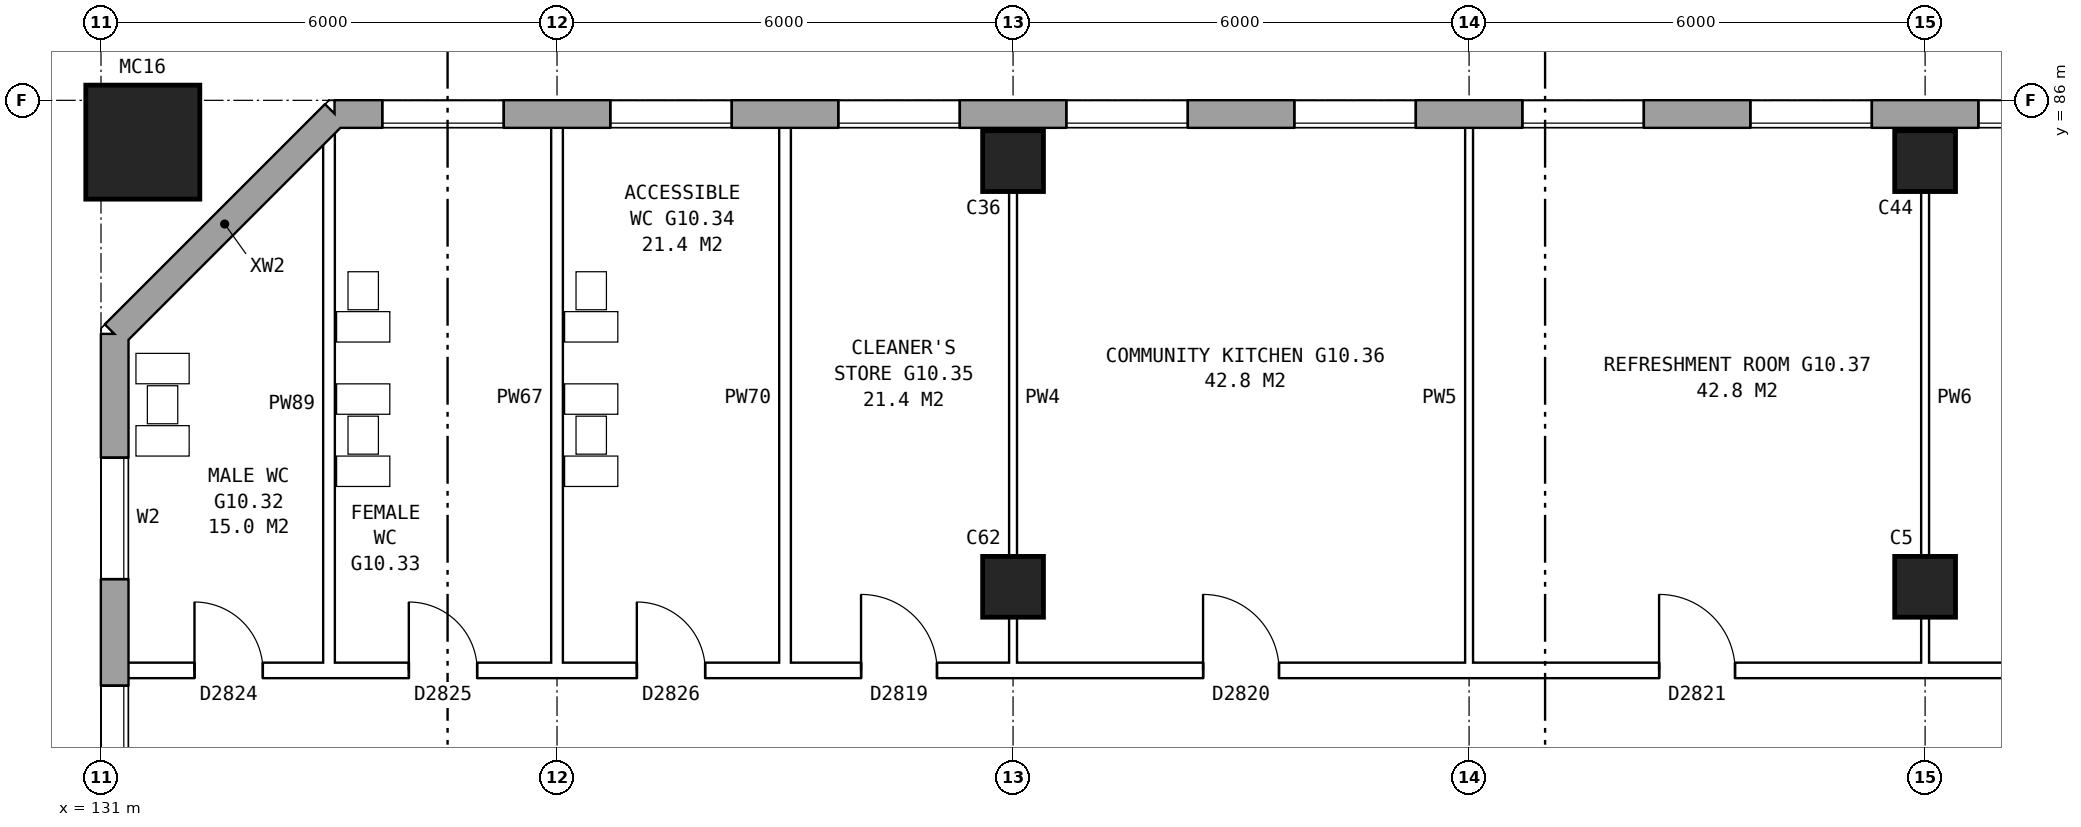
"""IFC4 building model, lengths in metres.
Left out: names, types, materials, properties, quantities, classifications, styles, units other than length and angle.
Written with IfcOpenShell. Run it as: python <this file> out.ifc"""

import sys

from ifc_helpers import new_model, si_unit, direction, frame, frame_2d, origin, origin_2d, place, context, subcontext, project, spatial, rectangle, hollow_rectangle, extrude, element, fill, save


model = new_model("IFC4")
c1 = context("Model", 3, precision=1e-05, world=origin(), true_north=direction((0.0, 1.0)))
c2 = subcontext(c1, "Body", "Model", "MODEL_VIEW")
j1 = project(units=[si_unit("LENGTHUNIT", "METRE"), si_unit("PLANEANGLEUNIT", "RADIAN")], contexts=[c1])
p1 = place(None, origin())
s1 = spatial("IfcSite", under=j1, at=p1, CompositionType="ELEMENT")
p2 = place(p1, origin())
s2 = spatial("IfcBuilding", under=s1, at=p2, CompositionType="ELEMENT")
p3 = place(p2, frame((0.0, 0.0, 38.1)))
s3 = spatial("IfcBuildingStorey", under=s2, at=p3, CompositionType="ELEMENT", Elevation=38.1)
for number, where, z_axis, x_axis in (
    (1, (143.0, 79.6, 0.0), (0.0, 0.0, 1.0), (1.0, 0.0, 0.0)),
    (2, (143.0, 85.2, 0.0), (0.0, 0.0, 1.0), (1.0, 0.0, 0.0)),
    (3, (155.0, 79.6, 0.0), (0.0, 0.0, 1.0), (1.0, 0.0, 0.0)),
    (4, (155.0, 85.2, 0.0), (0.0, 0.0, 1.0), (1.0, 0.0, 0.0)),
):
    element("IfcColumn", number, at=place(p3, frame(where, z_axis=z_axis, x_axis=x_axis)), inside=s3, PredefinedType="COLUMN", context=c2, shape_type="SweptSolid", body=[
        extrude(rectangle(XDim=0.8, YDim=0.8, at=origin_2d()), origin(), (0.0, 0.0, 1.0), 5.6),
    ])
p4 = place(p3, frame((131.55, 85.45, 0.0), z_axis=(0.0, 0.0, 1.0), x_axis=(1.0, 0.0, 0.0)))
e5 = element("IfcColumn", 5, at=p4, inside=s3, PredefinedType="COLUMN", context=c2, shape_type="SweptSolid", body=[
    extrude(hollow_rectangle(XDim=1.5, YDim=1.5, WallThickness=0.08, at=origin_2d()), origin(), (0.0, 0.0, 1.0), 6.2),
])
p5 = place(p3, frame((173.425, 85.82, 0.0), z_axis=(0.0, 0.0, 1.0), x_axis=(-1.0, 0.0, 0.0)))
e6 = element("IfcWall", 6, at=p5, inside=s3, PredefinedType="STANDARD", context=c2, shape_type="SweptSolid", body=[
    extrude(rectangle(XDim=39.351, YDim=0.36, at=frame_2d((19.675, 0.0))), origin(), (0.0, 0.0, 1.0), 5.6),
])
p6 = place(p5, frame((1.125, 0.0, 0.15)))
e7 = element("IfcOpeningElement", 7, at=p6, cuts=e6, PredefinedType="OPENING", context=c2, shape_type="SweptSolid", body=[
    extrude(rectangle(XDim=1.6, YDim=2.4, at=frame_2d((0.8, 1.2))), frame((0.0, 0.19, 0.0), z_axis=(0.0, -1.0, 0.0), x_axis=(1.0, 0.0, 0.0)), (0.0, 0.0, 1.0), 0.38),
])
p7 = place(p5, frame((4.125, 0.0, 0.15)))
e8 = element("IfcOpeningElement", 8, at=p7, cuts=e6, PredefinedType="OPENING", context=c2, shape_type="SweptSolid", body=[
    extrude(rectangle(XDim=1.6, YDim=2.4, at=frame_2d((0.8, 1.2))), frame((0.0, 0.19, 0.0), z_axis=(0.0, -1.0, 0.0), x_axis=(1.0, 0.0, 0.0)), (0.0, 0.0, 1.0), 0.38),
])
p8 = place(p5, frame((7.125, 0.0, 0.15)))
e9 = element("IfcOpeningElement", 9, at=p8, cuts=e6, PredefinedType="OPENING", context=c2, shape_type="SweptSolid", body=[
    extrude(rectangle(XDim=1.6, YDim=2.4, at=frame_2d((0.8, 1.2))), frame((0.0, 0.19, 0.0), z_axis=(0.0, -1.0, 0.0), x_axis=(1.0, 0.0, 0.0)), (0.0, 0.0, 1.0), 0.38),
])
p9 = place(p5, frame((10.125, 0.0, 0.15)))
e10 = element("IfcOpeningElement", 10, at=p9, cuts=e6, PredefinedType="OPENING", context=c2, shape_type="SweptSolid", body=[
    extrude(rectangle(XDim=1.6, YDim=2.4, at=frame_2d((0.8, 1.2))), frame((0.0, 0.19, 0.0), z_axis=(0.0, -1.0, 0.0), x_axis=(1.0, 0.0, 0.0)), (0.0, 0.0, 1.0), 0.38),
])
p10 = place(p5, frame((13.125, 0.0, 0.15)))
e11 = element("IfcOpeningElement", 11, at=p10, cuts=e6, PredefinedType="OPENING", context=c2, shape_type="SweptSolid", body=[
    extrude(rectangle(XDim=1.6, YDim=2.4, at=frame_2d((0.8, 1.2))), frame((0.0, 0.19, 0.0), z_axis=(0.0, -1.0, 0.0), x_axis=(1.0, 0.0, 0.0)), (0.0, 0.0, 1.0), 0.38),
])
p11 = place(p5, frame((16.125, 0.0, 0.15)))
e12 = element("IfcOpeningElement", 12, at=p11, cuts=e6, PredefinedType="OPENING", context=c2, shape_type="SweptSolid", body=[
    extrude(rectangle(XDim=1.6, YDim=2.4, at=frame_2d((0.8, 1.2))), frame((0.0, 0.19, 0.0), z_axis=(0.0, -1.0, 0.0), x_axis=(1.0, 0.0, 0.0)), (0.0, 0.0, 1.0), 0.38),
])
p12 = place(p5, frame((19.125, 0.0, 0.15)))
e13 = element("IfcOpeningElement", 13, at=p12, cuts=e6, PredefinedType="OPENING", context=c2, shape_type="SweptSolid", body=[
    extrude(rectangle(XDim=1.6, YDim=2.4, at=frame_2d((0.8, 1.2))), frame((0.0, 0.19, 0.0), z_axis=(0.0, -1.0, 0.0), x_axis=(1.0, 0.0, 0.0)), (0.0, 0.0, 1.0), 0.38),
])
p13 = place(p5, frame((22.125, 0.0, 0.15)))
e14 = element("IfcOpeningElement", 14, at=p13, cuts=e6, PredefinedType="OPENING", context=c2, shape_type="SweptSolid", body=[
    extrude(rectangle(XDim=1.6, YDim=2.4, at=frame_2d((0.8, 1.2))), frame((0.0, 0.19, 0.0), z_axis=(0.0, -1.0, 0.0), x_axis=(1.0, 0.0, 0.0)), (0.0, 0.0, 1.0), 0.38),
])
p14 = place(p5, frame((25.125, 0.0, 0.15)))
e15 = element("IfcOpeningElement", 15, at=p14, cuts=e6, PredefinedType="OPENING", context=c2, shape_type="SweptSolid", body=[
    extrude(rectangle(XDim=1.6, YDim=2.4, at=frame_2d((0.8, 1.2))), frame((0.0, 0.19, 0.0), z_axis=(0.0, -1.0, 0.0), x_axis=(1.0, 0.0, 0.0)), (0.0, 0.0, 1.0), 0.38),
])
p15 = place(p5, frame((28.125, 0.0, 0.15)))
e16 = element("IfcOpeningElement", 16, at=p15, cuts=e6, PredefinedType="OPENING", context=c2, shape_type="SweptSolid", body=[
    extrude(rectangle(XDim=1.6, YDim=2.4, at=frame_2d((0.8, 1.2))), frame((0.0, 0.19, 0.0), z_axis=(0.0, -1.0, 0.0), x_axis=(1.0, 0.0, 0.0)), (0.0, 0.0, 1.0), 0.38),
])
p16 = place(p5, frame((31.125, 0.0, 0.15)))
e17 = element("IfcOpeningElement", 17, at=p16, cuts=e6, PredefinedType="OPENING", context=c2, shape_type="SweptSolid", body=[
    extrude(rectangle(XDim=1.6, YDim=2.4, at=frame_2d((0.8, 1.2))), frame((0.0, 0.19, 0.0), z_axis=(0.0, -1.0, 0.0), x_axis=(1.0, 0.0, 0.0)), (0.0, 0.0, 1.0), 0.38),
])
p17 = place(p5, frame((34.125, 0.0, 0.15)))
e18 = element("IfcOpeningElement", 18, at=p17, cuts=e6, PredefinedType="OPENING", context=c2, shape_type="SweptSolid", body=[
    extrude(rectangle(XDim=1.6, YDim=2.4, at=frame_2d((0.8, 1.2))), frame((0.0, 0.19, 0.0), z_axis=(0.0, -1.0, 0.0), x_axis=(1.0, 0.0, 0.0)), (0.0, 0.0, 1.0), 0.38),
])
p18 = place(p5, frame((37.125, 0.0, 0.15)))
e19 = element("IfcOpeningElement", 19, at=p18, cuts=e6, PredefinedType="OPENING", context=c2, shape_type="SweptSolid", body=[
    extrude(rectangle(XDim=1.6, YDim=2.4, at=frame_2d((0.8, 1.2))), frame((0.0, 0.19, 0.0), z_axis=(0.0, -1.0, 0.0), x_axis=(1.0, 0.0, 0.0)), (0.0, 0.0, 1.0), 0.38),
])
p19 = place(p3, frame((134.075, 85.82, 0.0), z_axis=(0.0, 0.0, 1.0), x_axis=(-0.707106781187, -0.707106781187, 0.0)))
e20 = element("IfcWall", 20, at=p19, inside=s3, PredefinedType="STANDARD", context=c2, shape_type="SweptSolid", body=[
    extrude(rectangle(XDim=4.094, YDim=0.36, at=frame_2d((2.047, 0.0))), origin(), (0.0, 0.0, 1.0), 5.6),
])
p20 = place(p3, frame((131.18, 82.925, 0.0), z_axis=(0.0, 0.0, 1.0), x_axis=(0.0, -1.0, 0.0)))
e21 = element("IfcWall", 21, at=p20, inside=s3, PredefinedType="STANDARD", context=c2, shape_type="SweptSolid", body=[
    extrude(rectangle(XDim=25.851, YDim=0.36, at=frame_2d((12.925, 0.0))), origin(), (0.0, 0.0, 1.0), 5.6),
])
p21 = place(p20, frame((1.625, 0.0, 0.15)))
e22 = element("IfcOpeningElement", 22, at=p21, cuts=e21, PredefinedType="OPENING", context=c2, shape_type="SweptSolid", body=[
    extrude(rectangle(XDim=1.6, YDim=2.4, at=frame_2d((0.8, 1.2))), frame((0.0, 0.19, 0.0), z_axis=(0.0, -1.0, 0.0), x_axis=(1.0, 0.0, 0.0)), (0.0, 0.0, 1.0), 0.38),
])
p22 = place(p20, frame((4.625, 0.0, 0.15)))
e23 = element("IfcOpeningElement", 23, at=p22, cuts=e21, PredefinedType="OPENING", context=c2, shape_type="SweptSolid", body=[
    extrude(rectangle(XDim=1.6, YDim=2.4, at=frame_2d((0.8, 1.2))), frame((0.0, 0.19, 0.0), z_axis=(0.0, -1.0, 0.0), x_axis=(1.0, 0.0, 0.0)), (0.0, 0.0, 1.0), 0.38),
])
p23 = place(p20, frame((19.625, 0.0, 0.15)))
e24 = element("IfcOpeningElement", 24, at=p23, cuts=e21, PredefinedType="OPENING", context=c2, shape_type="SweptSolid", body=[
    extrude(rectangle(XDim=1.6, YDim=2.4, at=frame_2d((0.8, 1.2))), frame((0.0, 0.19, 0.0), z_axis=(0.0, -1.0, 0.0), x_axis=(1.0, 0.0, 0.0)), (0.0, 0.0, 1.0), 0.38),
])
p24 = place(p20, frame((22.625, 0.0, 0.15)))
e25 = element("IfcOpeningElement", 25, at=p24, cuts=e21, PredefinedType="OPENING", context=c2, shape_type="SweptSolid", body=[
    extrude(rectangle(XDim=1.6, YDim=2.4, at=frame_2d((0.8, 1.2))), frame((0.0, 0.19, 0.0), z_axis=(0.0, -1.0, 0.0), x_axis=(1.0, 0.0, 0.0)), (0.0, 0.0, 1.0), 0.38),
])
p25 = place(p3, frame((131.24, 78.5, 0.0), z_axis=(0.0, 0.0, 1.0), x_axis=(1.0, 0.0, 0.0)))
e26 = element("IfcWall", 26, at=p25, inside=s3, PredefinedType="PARTITIONING", context=c2, shape_type="SweptSolid", body=[
    extrude(rectangle(XDim=37.5, YDim=0.2, at=frame_2d((18.75, 0.0))), origin(), (0.0, 0.0, 1.0), 5.6),
])
p26 = place(p25, frame((0.99, 0.0, 0.0)))
e27 = element("IfcOpeningElement", 27, at=p26, cuts=e26, PredefinedType="OPENING", context=c2, shape_type="SweptSolid", body=[
    extrude(rectangle(XDim=0.9, YDim=2.1, at=frame_2d((0.45, 1.05))), frame((0.0, 0.11, 0.0), z_axis=(0.0, -1.0, 0.0), x_axis=(1.0, 0.0, 0.0)), (0.0, 0.0, 1.0), 0.22),
])
p27 = place(p25, frame((3.81, 0.0, 0.0)))
e28 = element("IfcOpeningElement", 28, at=p27, cuts=e26, PredefinedType="OPENING", context=c2, shape_type="SweptSolid", body=[
    extrude(rectangle(XDim=0.9, YDim=2.1, at=frame_2d((0.45, 1.05))), frame((0.0, 0.11, 0.0), z_axis=(0.0, -1.0, 0.0), x_axis=(1.0, 0.0, 0.0)), (0.0, 0.0, 1.0), 0.22),
])
p28 = place(p25, frame((6.81, 0.0, 0.0)))
e29 = element("IfcOpeningElement", 29, at=p28, cuts=e26, PredefinedType="OPENING", context=c2, shape_type="SweptSolid", body=[
    extrude(rectangle(XDim=0.9, YDim=2.1, at=frame_2d((0.45, 1.05))), frame((0.0, 0.11, 0.0), z_axis=(0.0, -1.0, 0.0), x_axis=(1.0, 0.0, 0.0)), (0.0, 0.0, 1.0), 0.22),
])
p29 = place(p25, frame((9.76, 0.0, 0.0)))
e30 = element("IfcOpeningElement", 30, at=p29, cuts=e26, PredefinedType="OPENING", context=c2, shape_type="SweptSolid", body=[
    extrude(rectangle(XDim=1.0, YDim=2.1, at=frame_2d((0.5, 1.05))), frame((0.0, 0.11, 0.0), z_axis=(0.0, -1.0, 0.0), x_axis=(1.0, 0.0, 0.0)), (0.0, 0.0, 1.0), 0.22),
])
p30 = place(p25, frame((14.26, 0.0, 0.0)))
e31 = element("IfcOpeningElement", 31, at=p30, cuts=e26, PredefinedType="OPENING", context=c2, shape_type="SweptSolid", body=[
    extrude(rectangle(XDim=1.0, YDim=2.1, at=frame_2d((0.5, 1.05))), frame((0.0, 0.11, 0.0), z_axis=(0.0, -1.0, 0.0), x_axis=(1.0, 0.0, 0.0)), (0.0, 0.0, 1.0), 0.22),
])
p31 = place(p25, frame((20.26, 0.0, 0.0)))
e32 = element("IfcOpeningElement", 32, at=p31, cuts=e26, PredefinedType="OPENING", context=c2, shape_type="SweptSolid", body=[
    extrude(rectangle(XDim=1.0, YDim=2.1, at=frame_2d((0.5, 1.05))), frame((0.0, 0.11, 0.0), z_axis=(0.0, -1.0, 0.0), x_axis=(1.0, 0.0, 0.0)), (0.0, 0.0, 1.0), 0.22),
])
p32 = place(p25, frame((26.26, 0.0, 0.0)))
e33 = element("IfcOpeningElement", 33, at=p32, cuts=e26, PredefinedType="OPENING", context=c2, shape_type="SweptSolid", body=[
    extrude(rectangle(XDim=1.0, YDim=2.1, at=frame_2d((0.5, 1.05))), frame((0.0, 0.11, 0.0), z_axis=(0.0, -1.0, 0.0), x_axis=(1.0, 0.0, 0.0)), (0.0, 0.0, 1.0), 0.22),
])
p33 = place(p25, frame((33.08, 0.0, 0.0)))
e34 = element("IfcOpeningElement", 34, at=p33, cuts=e26, PredefinedType="OPENING", context=c2, shape_type="SweptSolid", body=[
    extrude(rectangle(XDim=1.0, YDim=2.1, at=frame_2d((0.5, 1.05))), frame((0.0, 0.11, 0.0), z_axis=(0.0, -1.0, 0.0), x_axis=(1.0, 0.0, 0.0)), (0.0, 0.0, 1.0), 0.22),
])
p34 = place(p3, frame((134.0, 78.4, 0.0), z_axis=(0.0, 0.0, 1.0), x_axis=(0.0, 1.0, 0.0)))
e35 = element("IfcWall", 35, at=p34, inside=s3, PredefinedType="PLUMBINGWALL", context=c2, shape_type="SweptSolid", body=[
    extrude(rectangle(XDim=7.211, YDim=0.15, at=frame_2d((3.605, 0.0))), origin(), (0.0, 0.0, 1.0), 5.6),
])
for number, where, z_axis, x_axis in (
    (36, (137.0, 78.4, 0.0), (0.0, 0.0, 1.0), (0.0, 1.0, 0.0)),
    (37, (140.0, 78.4, 0.0), (0.0, 0.0, 1.0), (0.0, 1.0, 0.0)),
):
    element("IfcWall", number, at=place(p3, frame(where, z_axis=z_axis, x_axis=x_axis)), inside=s3, PredefinedType="PLUMBINGWALL", context=c2, shape_type="SweptSolid", body=[
        extrude(rectangle(XDim=7.36, YDim=0.15, at=frame_2d((3.68, 0.0))), origin(), (0.0, 0.0, 1.0), 5.6),
    ])
for number, where, z_axis, x_axis in (
    (38, (143.0, 78.4, 0.0), (0.0, 0.0, 1.0), (0.0, 1.0, 0.0)),
    (39, (149.0, 78.4, 0.0), (0.0, 0.0, 1.0), (0.0, 1.0, 0.0)),
    (40, (155.0, 78.4, 0.0), (0.0, 0.0, 1.0), (0.0, 1.0, 0.0)),
):
    element("IfcWall", number, at=place(p3, frame(where, z_axis=z_axis, x_axis=x_axis)), inside=s3, PredefinedType="PARTITIONING", context=c2, shape_type="SweptSolid", body=[
        extrude(rectangle(XDim=7.36, YDim=0.1, at=frame_2d((3.68, 0.0))), origin(), (0.0, 0.0, 1.0), 5.6),
    ])
p35 = place(p11, origin())
e41 = element("IfcWindow", 41, at=p35, inside=s3, PartitioningType="SINGLE_PANEL", PredefinedType="WINDOW", context=c2, shape_type="SweptSolid", body=[
    extrude(rectangle(XDim=1.6, YDim=2.4, at=frame_2d((0.8, 1.2))), frame((0.0, 0.15, 0.0), z_axis=(0.0, -1.0, 0.0), x_axis=(1.0, 0.0, 0.0)), (0.0, 0.0, 1.0), 0.06),
])
fill(e12, e41)
p36 = place(p12, origin())
e42 = element("IfcWindow", 42, at=p36, inside=s3, PartitioningType="SINGLE_PANEL", PredefinedType="WINDOW", context=c2, shape_type="SweptSolid", body=[
    extrude(rectangle(XDim=1.6, YDim=2.4, at=frame_2d((0.8, 1.2))), frame((0.0, 0.15, 0.0), z_axis=(0.0, -1.0, 0.0), x_axis=(1.0, 0.0, 0.0)), (0.0, 0.0, 1.0), 0.06),
])
fill(e13, e42)
p37 = place(p13, origin())
e43 = element("IfcWindow", 43, at=p37, inside=s3, PartitioningType="SINGLE_PANEL", PredefinedType="WINDOW", context=c2, shape_type="SweptSolid", body=[
    extrude(rectangle(XDim=1.6, YDim=2.4, at=frame_2d((0.8, 1.2))), frame((0.0, 0.15, 0.0), z_axis=(0.0, -1.0, 0.0), x_axis=(1.0, 0.0, 0.0)), (0.0, 0.0, 1.0), 0.06),
])
fill(e14, e43)
p38 = place(p14, origin())
e44 = element("IfcWindow", 44, at=p38, inside=s3, PartitioningType="SINGLE_PANEL", PredefinedType="WINDOW", context=c2, shape_type="SweptSolid", body=[
    extrude(rectangle(XDim=1.6, YDim=2.4, at=frame_2d((0.8, 1.2))), frame((0.0, 0.15, 0.0), z_axis=(0.0, -1.0, 0.0), x_axis=(1.0, 0.0, 0.0)), (0.0, 0.0, 1.0), 0.06),
])
fill(e15, e44)
p39 = place(p15, origin())
e45 = element("IfcWindow", 45, at=p39, inside=s3, PartitioningType="SINGLE_PANEL", PredefinedType="WINDOW", context=c2, shape_type="SweptSolid", body=[
    extrude(rectangle(XDim=1.6, YDim=2.4, at=frame_2d((0.8, 1.2))), frame((0.0, 0.15, 0.0), z_axis=(0.0, -1.0, 0.0), x_axis=(1.0, 0.0, 0.0)), (0.0, 0.0, 1.0), 0.06),
])
fill(e16, e45)
p40 = place(p16, origin())
e46 = element("IfcWindow", 46, at=p40, inside=s3, PartitioningType="SINGLE_PANEL", PredefinedType="WINDOW", context=c2, shape_type="SweptSolid", body=[
    extrude(rectangle(XDim=1.6, YDim=2.4, at=frame_2d((0.8, 1.2))), frame((0.0, 0.15, 0.0), z_axis=(0.0, -1.0, 0.0), x_axis=(1.0, 0.0, 0.0)), (0.0, 0.0, 1.0), 0.06),
])
fill(e17, e46)
p41 = place(p17, origin())
e47 = element("IfcWindow", 47, at=p41, inside=s3, PartitioningType="SINGLE_PANEL", PredefinedType="WINDOW", context=c2, shape_type="SweptSolid", body=[
    extrude(rectangle(XDim=1.6, YDim=2.4, at=frame_2d((0.8, 1.2))), frame((0.0, 0.15, 0.0), z_axis=(0.0, -1.0, 0.0), x_axis=(1.0, 0.0, 0.0)), (0.0, 0.0, 1.0), 0.06),
])
fill(e18, e47)
p42 = place(p18, origin())
e48 = element("IfcWindow", 48, at=p42, inside=s3, PartitioningType="SINGLE_PANEL", PredefinedType="WINDOW", context=c2, shape_type="SweptSolid", body=[
    extrude(rectangle(XDim=1.6, YDim=2.4, at=frame_2d((0.8, 1.2))), frame((0.0, 0.15, 0.0), z_axis=(0.0, -1.0, 0.0), x_axis=(1.0, 0.0, 0.0)), (0.0, 0.0, 1.0), 0.06),
])
fill(e19, e48)
p43 = place(p21, origin())
e49 = element("IfcWindow", 49, at=p43, inside=s3, PartitioningType="SINGLE_PANEL", PredefinedType="WINDOW", context=c2, shape_type="SweptSolid", body=[
    extrude(rectangle(XDim=1.6, YDim=2.4, at=frame_2d((0.8, 1.2))), frame((0.0, 0.15, 0.0), z_axis=(0.0, -1.0, 0.0), x_axis=(1.0, 0.0, 0.0)), (0.0, 0.0, 1.0), 0.06),
])
fill(e22, e49)
p44 = place(p22, origin())
e50 = element("IfcWindow", 50, at=p44, inside=s3, PartitioningType="SINGLE_PANEL", PredefinedType="WINDOW", context=c2, shape_type="SweptSolid", body=[
    extrude(rectangle(XDim=1.6, YDim=2.4, at=frame_2d((0.8, 1.2))), frame((0.0, 0.15, 0.0), z_axis=(0.0, -1.0, 0.0), x_axis=(1.0, 0.0, 0.0)), (0.0, 0.0, 1.0), 0.06),
])
fill(e23, e50)
p45 = place(p26, origin())
e51 = element("IfcDoor", 51, at=p45, inside=s3, OperationType="SINGLE_SWING_LEFT", PredefinedType="DOOR", context=c2, shape_type="SweptSolid", body=[
    extrude(rectangle(XDim=0.9, YDim=2.1, at=frame_2d((0.45, 1.05))), frame((0.0, 0.025, 0.0), z_axis=(0.0, -1.0, 0.0), x_axis=(1.0, 0.0, 0.0)), (0.0, 0.0, 1.0), 0.05),
])
fill(e27, e51)
p46 = place(p27, origin())
e52 = element("IfcDoor", 52, at=p46, inside=s3, OperationType="SINGLE_SWING_LEFT", PredefinedType="DOOR", context=c2, shape_type="SweptSolid", body=[
    extrude(rectangle(XDim=0.9, YDim=2.1, at=frame_2d((0.45, 1.05))), frame((0.0, 0.025, 0.0), z_axis=(0.0, -1.0, 0.0), x_axis=(1.0, 0.0, 0.0)), (0.0, 0.0, 1.0), 0.05),
])
fill(e28, e52)
p47 = place(p28, origin())
e53 = element("IfcDoor", 53, at=p47, inside=s3, OperationType="SINGLE_SWING_LEFT", PredefinedType="DOOR", context=c2, shape_type="SweptSolid", body=[
    extrude(rectangle(XDim=0.9, YDim=2.1, at=frame_2d((0.45, 1.05))), frame((0.0, 0.025, 0.0), z_axis=(0.0, -1.0, 0.0), x_axis=(1.0, 0.0, 0.0)), (0.0, 0.0, 1.0), 0.05),
])
fill(e29, e53)
p48 = place(p29, origin())
e54 = element("IfcDoor", 54, at=p48, inside=s3, OperationType="SINGLE_SWING_LEFT", PredefinedType="DOOR", context=c2, shape_type="SweptSolid", body=[
    extrude(rectangle(XDim=1.0, YDim=2.1, at=frame_2d((0.5, 1.05))), frame((0.0, 0.025, 0.0), z_axis=(0.0, -1.0, 0.0), x_axis=(1.0, 0.0, 0.0)), (0.0, 0.0, 1.0), 0.05),
])
fill(e30, e54)
p49 = place(p30, origin())
e55 = element("IfcDoor", 55, at=p49, inside=s3, OperationType="SINGLE_SWING_LEFT", PredefinedType="DOOR", context=c2, shape_type="SweptSolid", body=[
    extrude(rectangle(XDim=1.0, YDim=2.1, at=frame_2d((0.5, 1.05))), frame((0.0, 0.025, 0.0), z_axis=(0.0, -1.0, 0.0), x_axis=(1.0, 0.0, 0.0)), (0.0, 0.0, 1.0), 0.05),
])
fill(e31, e55)
p50 = place(p31, origin())
e56 = element("IfcDoor", 56, at=p50, inside=s3, OperationType="SINGLE_SWING_LEFT", PredefinedType="DOOR", context=c2, shape_type="SweptSolid", body=[
    extrude(rectangle(XDim=1.0, YDim=2.1, at=frame_2d((0.5, 1.05))), frame((0.0, 0.025, 0.0), z_axis=(0.0, -1.0, 0.0), x_axis=(1.0, 0.0, 0.0)), (0.0, 0.0, 1.0), 0.05),
])
fill(e32, e56)
save(model, sys.argv[1])
